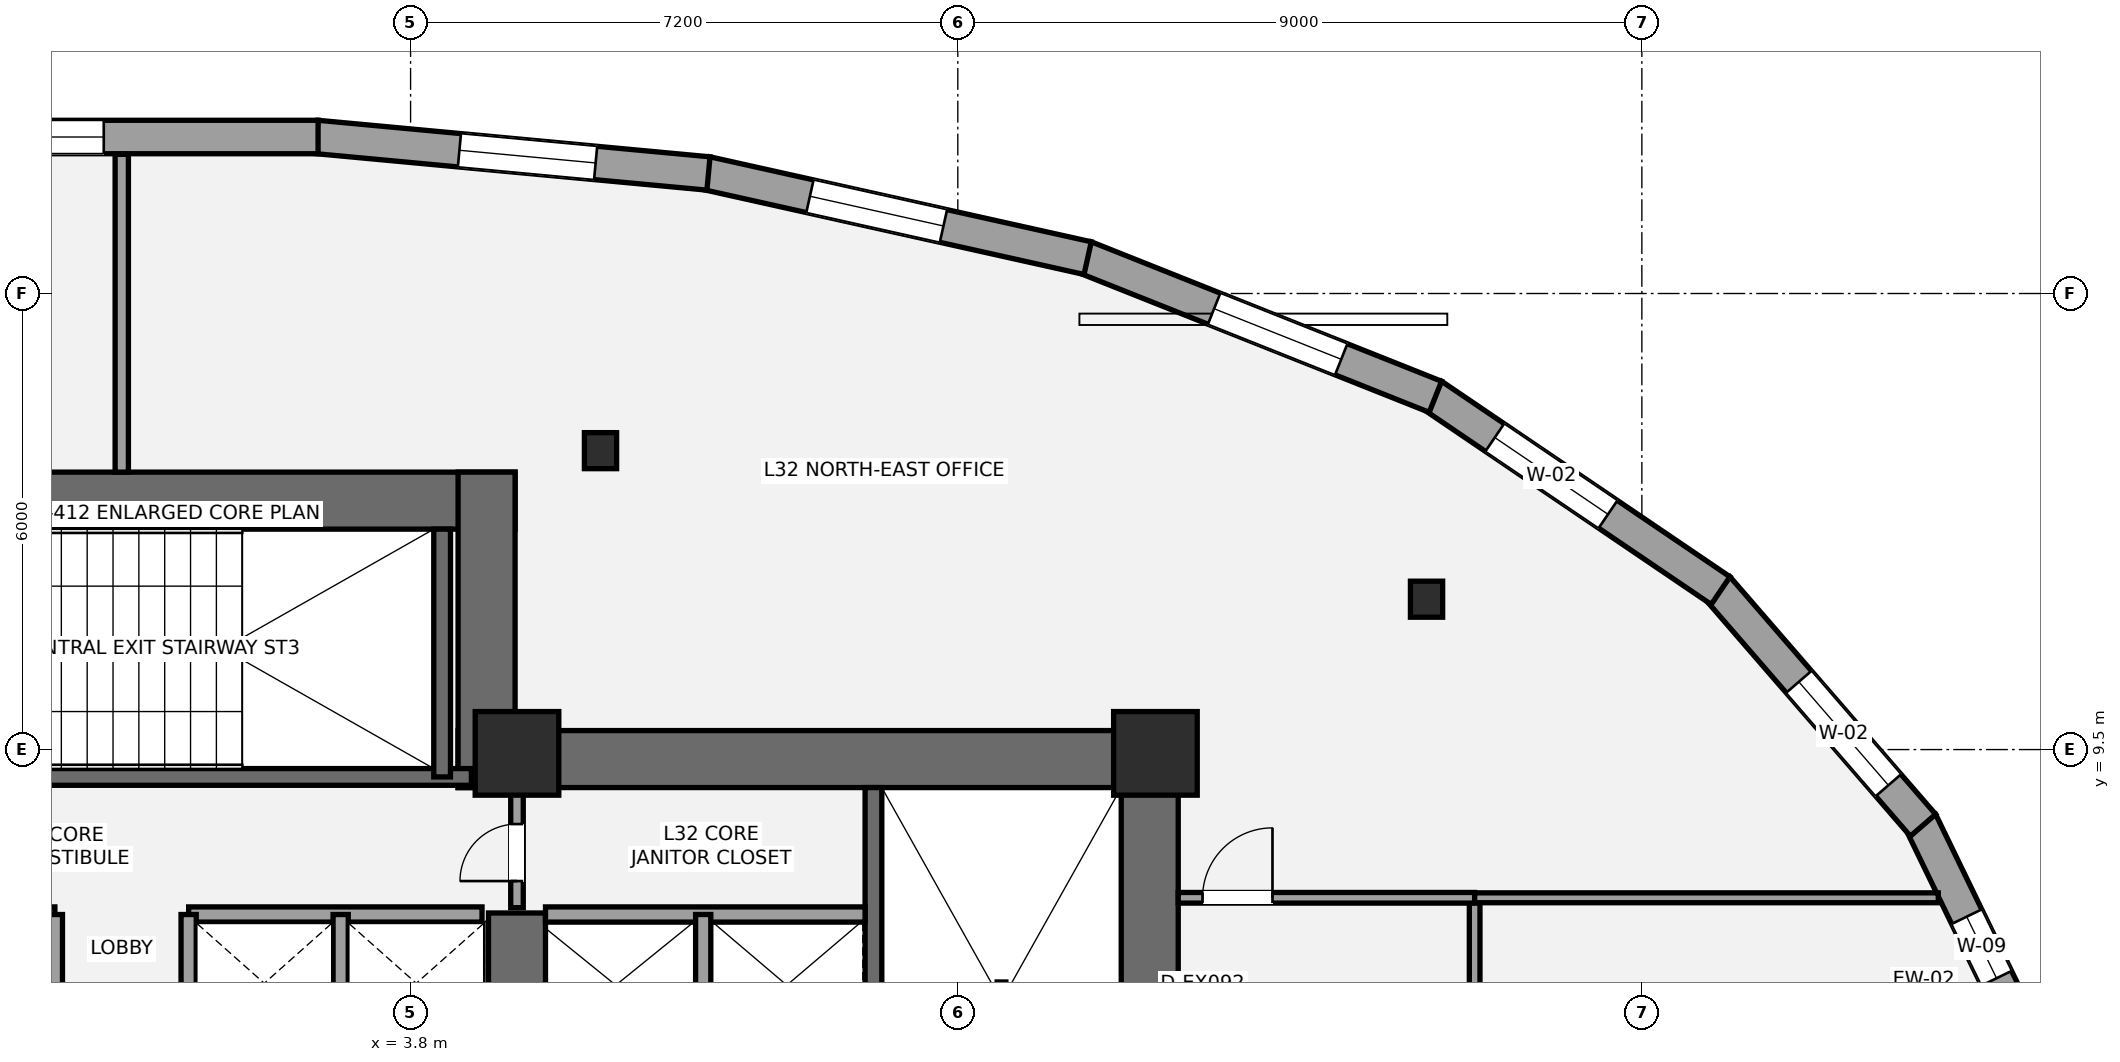
"""IFC4 building model, lengths in metres.
Left out: names, types, materials, properties, quantities, classifications, styles, units other than length and angle.
Written with IfcOpenShell. Run it as: python <this file> out.ifc"""

import sys

from ifc_helpers import new_model, si_unit, direction, frame, frame_2d, origin, origin_2d, place, context, subcontext, project, spatial, rectangle, i_section, extrude, element, fill, save


model = new_model("IFC4")
c1 = context("Model", 3, precision=1e-05, world=origin(), true_north=direction((0.0, 1.0)))
c2 = subcontext(c1, "Body", "Model", "MODEL_VIEW")
j1 = project(units=[si_unit("LENGTHUNIT", "METRE"), si_unit("PLANEANGLEUNIT", "RADIAN")], contexts=[c1])
p1 = place(None, origin())
s1 = spatial("IfcSite", under=j1, at=p1, CompositionType="ELEMENT")
p2 = place(p1, origin())
s2 = spatial("IfcBuilding", under=s1, at=p2, CompositionType="ELEMENT")
p3 = place(p2, frame((0.0, 0.0, 121.1)))
s3 = spatial("IfcBuildingStorey", under=s2, at=p3, CompositionType="ELEMENT", Elevation=121.1)
p4 = place(p3, frame((13.525, 1.1, 0.0), z_axis=(0.0, 0.0, 1.0), x_axis=(0.0, 1.0, 0.0)))
e1 = element("IfcWall", 1, at=p4, inside=s3, PredefinedType="SHEAR", context=c2, shape_type="SweptSolid", body=[
    extrude(rectangle(XDim=8.65, YDim=0.75, at=frame_2d((4.325, 0.0))), origin(), (0.0, 0.0, 1.0), 3.5),
])
p5 = place(p3, frame((4.425, 9.375, 0.0), z_axis=(0.0, 0.0, 1.0), x_axis=(1.0, 0.0, 0.0)))
e2 = element("IfcWall", 2, at=p5, inside=s3, PredefinedType="SHEAR", context=c2, shape_type="SweptSolid", body=[
    extrude(rectangle(XDim=9.475, YDim=0.75, at=frame_2d((4.737, 0.0))), origin(), (0.0, 0.0, 1.0), 3.5),
])
p6 = place(p3, frame((5.2, 5.35, 0.0), z_axis=(0.0, 0.0, 1.0), x_axis=(0.0, 1.0, 0.0)))
e3 = element("IfcWall", 3, at=p6, inside=s3, PredefinedType="SHEAR", context=c2, shape_type="SweptSolid", body=[
    extrude(rectangle(XDim=2.0, YDim=0.75, at=frame_2d((1.0, 0.0))), origin(), (0.0, 0.0, 1.0), 3.5),
])
p7 = place(p3, frame((9.89, 1.85, 0.0), z_axis=(0.0, 0.0, 1.0), x_axis=(0.0, 1.0, 0.0)))
e4 = element("IfcWall", 4, at=p7, inside=s3, PredefinedType="SHEAR", context=c2, shape_type="SweptSolid", body=[
    extrude(rectangle(XDim=7.15, YDim=0.22, at=frame_2d((3.575, 0.0))), origin(), (0.0, 0.0, 1.0), 3.5),
])
p8 = place(p3, frame((-5.175, 12.775, 0.0), z_axis=(0.0, 0.0, 1.0), x_axis=(1.0, 0.0, 0.0)))
e5 = element("IfcWall", 5, at=p8, inside=s3, PredefinedType="SHEAR", context=c2, shape_type="SweptSolid", body=[
    extrude(rectangle(XDim=10.35, YDim=0.75, at=frame_2d((5.175, 0.0))), origin(), (0.0, 0.0, 1.0), 3.5),
])
p9 = place(p3, frame((4.8, 9.0, 0.0), z_axis=(0.0, 0.0, 1.0), x_axis=(0.0, 1.0, 0.0)))
e6 = element("IfcWall", 6, at=p9, inside=s3, PredefinedType="SHEAR", context=c2, shape_type="SweptSolid", body=[
    extrude(rectangle(XDim=4.15, YDim=0.75, at=frame_2d((2.075, 0.0))), origin(), (0.0, 0.0, 1.0), 3.5),
])
p10 = place(p3, frame((-4.7, 9.14, 0.0), z_axis=(0.0, 0.0, 1.0), x_axis=(1.0, 0.0, 0.0)))
e7 = element("IfcWall", 7, at=p10, inside=s3, PredefinedType="SHEAR", context=c2, shape_type="SweptSolid", body=[
    extrude(rectangle(XDim=9.3, YDim=0.22, at=frame_2d((4.65, 0.0))), origin(), (0.0, 0.0, 1.0), 3.5),
])
p11 = place(p10, frame((1.15, 0.0, 0.0)))
e8 = element("IfcOpeningElement", 8, at=p11, cuts=e7, PredefinedType="OPENING", context=c2, shape_type="SweptSolid", body=[
    extrude(rectangle(XDim=1.05, YDim=2.15, at=frame_2d((0.525, 1.075))), frame((0.0, 0.12, 0.0), z_axis=(0.0, -1.0, 0.0), x_axis=(1.0, 0.0, 0.0)), (0.0, 0.0, 1.0), 0.24),
])
p12 = place(p3, frame((4.215, 9.14, 0.0), z_axis=(0.0, 0.0, 1.0), x_axis=(0.0, 1.0, 0.0)))
e9 = element("IfcWall", 9, at=p12, inside=s3, PredefinedType="SHEAR", context=c2, shape_type="SweptSolid", body=[
    extrude(rectangle(XDim=3.26, YDim=0.22, at=frame_2d((1.63, 0.0))), origin(), (0.0, 0.0, 1.0), 3.5),
])
for number, where, z_axis, x_axis in (
    (10, (5.2, 9.45, 0.0), (0.0, 0.0, 1.0), (1.0, 0.0, 0.0)),
    (11, (13.6, 9.45, 0.0), (0.0, 0.0, 1.0), (1.0, 0.0, 0.0)),
):
    element("IfcColumn", number, at=place(p3, frame(where, z_axis=z_axis, x_axis=x_axis)), inside=s3, PredefinedType="COLUMN", context=c2, shape_type="SweptSolid", body=[
        extrude(rectangle(XDim=1.1, YDim=1.1, at=origin_2d()), origin(), (0.0, 0.0, 1.0), 3.5),
    ])
for number, where, z_axis, x_axis in (
    (12, (17.167, 11.478, 0.0), (0.0, 0.0, 1.0), (1.0, 0.0, 0.0)),
    (13, (6.299, 13.433, 0.0), (0.0, 0.0, 1.0), (1.0, 0.0, 0.0)),
):
    element("IfcColumn", number, at=place(p3, frame(where, z_axis=z_axis, x_axis=x_axis)), inside=s3, PredefinedType="COLUMN", context=c2, shape_type="SweptSolid", body=[
        extrude(i_section(OverallWidth=0.424, OverallDepth=0.474, WebThickness=0.048, FlangeThickness=0.077, at=origin_2d()), origin(), (0.0, 0.0, 1.0), 3.5),
    ])
p13 = place(p3, frame((23.667, 8.552, 0.0), z_axis=(0.0, 0.0, 1.0), x_axis=(0.43625131955, -0.899824864177, 0.0)))
e14 = element("IfcWall", 14, at=p13, inside=s3, PredefinedType="STANDARD", context=c2, shape_type="SweptSolid", body=[
    extrude(rectangle(XDim=3.78, YDim=0.44, at=frame_2d((1.89, 0.0))), origin(), (0.0, 0.0, 1.0), 2.528),
])
p14 = place(p13, frame((1.39, 0.0, 0.92)))
e15 = element("IfcOpeningElement", 15, at=p14, cuts=e14, PredefinedType="OPENING", context=c2, shape_type="SweptSolid", body=[
    extrude(rectangle(XDim=0.9, YDim=1.35, at=frame_2d((0.45, 0.675))), frame((0.0, 0.23, 0.0), z_axis=(0.0, -1.0, 0.0), x_axis=(1.0, 0.0, 0.0)), (0.0, 0.0, 1.0), 0.46),
])
p15 = place(p3, frame((20.993, 11.629, 0.0), z_axis=(0.0, 0.0, 1.0), x_axis=(0.654644924638, -0.755936520249, 0.0)))
e16 = element("IfcWall", 16, at=p15, inside=s3, PredefinedType="STANDARD", context=c2, shape_type="SweptSolid", body=[
    extrude(rectangle(XDim=4.134, YDim=0.44, at=frame_2d((2.067, 0.0))), origin(), (0.0, 0.0, 1.0), 2.528),
])
p16 = place(p15, frame((1.638, 0.0, 0.65)))
e17 = element("IfcOpeningElement", 17, at=p16, cuts=e16, PredefinedType="OPENING", context=c2, shape_type="SweptSolid", body=[
    extrude(rectangle(XDim=1.8, YDim=1.7, at=frame_2d((0.9, 0.85))), frame((0.0, 0.23, 0.0), z_axis=(0.0, -1.0, 0.0), x_axis=(1.0, 0.0, 0.0)), (0.0, 0.0, 1.0), 0.46),
])
p17 = place(p3, frame((17.241, 14.164, 0.0), z_axis=(0.0, 0.0, 1.0), x_axis=(0.827707240431, -0.56116015908, 0.0)))
e18 = element("IfcWall", 18, at=p17, inside=s3, PredefinedType="STANDARD", context=c2, shape_type="SweptSolid", body=[
    extrude(rectangle(XDim=4.584, YDim=0.44, at=frame_2d((2.292, 0.0))), origin(), (0.0, 0.0, 1.0), 2.528),
])
p18 = place(p17, frame((0.995, 0.0, 0.65)))
e19 = element("IfcOpeningElement", 19, at=p18, cuts=e18, PredefinedType="OPENING", context=c2, shape_type="SweptSolid", body=[
    extrude(rectangle(XDim=1.8, YDim=1.7, at=frame_2d((0.9, 0.85))), frame((0.0, 0.23, 0.0), z_axis=(0.0, -1.0, 0.0), x_axis=(1.0, 0.0, 0.0)), (0.0, 0.0, 1.0), 0.46),
])
p19 = place(p3, frame((12.675, 15.976, 0.0), z_axis=(0.0, 0.0, 1.0), x_axis=(0.929089765506, -0.369854305953, 0.0)))
e20 = element("IfcWall", 20, at=p19, inside=s3, PredefinedType="STANDARD", context=c2, shape_type="SweptSolid", body=[
    extrude(rectangle(XDim=4.961, YDim=0.44, at=frame_2d((2.48, 0.0))), origin(), (0.0, 0.0, 1.0), 2.528),
])
p20 = place(p19, frame((1.827, 0.0, 0.65)))
e21 = element("IfcOpeningElement", 21, at=p20, cuts=e20, PredefinedType="OPENING", context=c2, shape_type="SweptSolid", body=[
    extrude(rectangle(XDim=1.8, YDim=1.7, at=frame_2d((0.9, 0.85))), frame((0.0, 0.23, 0.0), z_axis=(0.0, -1.0, 0.0), x_axis=(1.0, 0.0, 0.0)), (0.0, 0.0, 1.0), 0.46),
])
p21 = place(p3, frame((7.692, 17.083, 0.0), z_axis=(0.0, 0.0, 1.0), x_axis=(0.976058355685, -0.217508818896, 0.0)))
e22 = element("IfcWall", 22, at=p21, inside=s3, PredefinedType="STANDARD", context=c2, shape_type="SweptSolid", body=[
    extrude(rectangle(XDim=5.14, YDim=0.44, at=frame_2d((2.57, 0.0))), origin(), (0.0, 0.0, 1.0), 2.528),
])
p22 = place(p21, frame((1.396, 0.0, 0.65)))
e23 = element("IfcOpeningElement", 23, at=p22, cuts=e22, PredefinedType="OPENING", context=c2, shape_type="SweptSolid", body=[
    extrude(rectangle(XDim=1.8, YDim=1.7, at=frame_2d((0.9, 0.85))), frame((0.0, 0.23, 0.0), z_axis=(0.0, -1.0, 0.0), x_axis=(1.0, 0.0, 0.0)), (0.0, 0.0, 1.0), 0.46),
])
p23 = place(p3, frame((2.562, 17.56, 0.0), z_axis=(0.0, 0.0, 1.0), x_axis=(0.995683099415, -0.092817916047, 0.0)))
e24 = element("IfcWall", 24, at=p23, inside=s3, PredefinedType="STANDARD", context=c2, shape_type="SweptSolid", body=[
    extrude(rectangle(XDim=5.179, YDim=0.44, at=frame_2d((2.59, 0.0))), origin(), (0.0, 0.0, 1.0), 2.528),
])
p24 = place(p23, frame((1.888, 0.0, 0.65)))
e25 = element("IfcOpeningElement", 25, at=p24, cuts=e24, PredefinedType="OPENING", context=c2, shape_type="SweptSolid", body=[
    extrude(rectangle(XDim=1.8, YDim=1.7, at=frame_2d((0.9, 0.85))), frame((0.0, 0.23, 0.0), z_axis=(0.0, -1.0, 0.0), x_axis=(1.0, 0.0, 0.0)), (0.0, 0.0, 1.0), 0.46),
])
p25 = place(p3, frame((-2.583, 17.559, 0.0), z_axis=(0.0, 0.0, 1.0), x_axis=(1.0, 0.0, 0.0)))
e26 = element("IfcWall", 26, at=p25, inside=s3, PredefinedType="STANDARD", context=c2, shape_type="SweptSolid", body=[
    extrude(rectangle(XDim=5.166, YDim=0.44, at=frame_2d((2.583, 0.0))), origin(), (0.0, 0.0, 1.0), 2.528),
])
p26 = place(p25, frame((0.546, 0.0, 0.65)))
e27 = element("IfcOpeningElement", 27, at=p26, cuts=e26, PredefinedType="OPENING", context=c2, shape_type="SweptSolid", body=[
    extrude(rectangle(XDim=1.8, YDim=1.7, at=frame_2d((0.9, 0.85))), frame((0.0, 0.23, 0.0), z_axis=(0.0, -1.0, 0.0), x_axis=(1.0, 0.0, 0.0)), (0.0, 0.0, 1.0), 0.46),
])
p27 = place(p3, frame((5.575, 7.33, 0.0), z_axis=(0.0, 0.0, 1.0), x_axis=(1.0, 0.0, 0.0)))
e28 = element("IfcWall", 28, at=p27, inside=s3, PredefinedType="SOLIDWALL", context=c2, shape_type="SweptSolid", body=[
    extrude(rectangle(XDim=4.205, YDim=0.2, at=frame_2d((2.103, 0.0))), origin(), (0.0, 0.0, 1.0), 3.31),
])
p28 = place(p3, frame((7.65, 5.47, 0.0), z_axis=(0.0, 0.0, 1.0), x_axis=(0.0, 1.0, 0.0)))
e29 = element("IfcWall", 29, at=p28, inside=s3, PredefinedType="SOLIDWALL", context=c2, shape_type="SweptSolid", body=[
    extrude(rectangle(XDim=1.86, YDim=0.2, at=frame_2d((0.93, 0.0))), origin(), (0.0, 0.0, 1.0), 3.31),
])
for number, where, z_axis, x_axis in (
    (30, (-4.74, 7.33, 0.0), (0.0, 0.0, 1.0), (1.0, 0.0, 0.0)),
    (31, (0.88, 7.33, 0.0), (0.0, 0.0, 1.0), (1.0, 0.0, 0.0)),
):
    element("IfcWall", number, at=place(p3, frame(where, z_axis=z_axis, x_axis=x_axis)), inside=s3, PredefinedType="SOLIDWALL", context=c2, shape_type="SweptSolid", body=[
        extrude(rectangle(XDim=3.86, YDim=0.2, at=frame_2d((1.93, 0.0))), origin(), (0.0, 0.0, 1.0), 3.31),
    ])
for number, where, z_axis, x_axis in (
    (32, (2.88, 5.52, 0.0), (0.0, 0.0, 1.0), (0.0, 1.0, 0.0)),
    (33, (-0.88, 5.52, 0.0), (0.0, 0.0, 1.0), (0.0, 1.0, 0.0)),
    (34, (0.88, 5.52, 0.0), (0.0, 0.0, 1.0), (0.0, 1.0, 0.0)),
):
    element("IfcWall", number, at=place(p3, frame(where, z_axis=z_axis, x_axis=x_axis)), inside=s3, PredefinedType="SOLIDWALL", context=c2, shape_type="SweptSolid", body=[
        extrude(rectangle(XDim=1.81, YDim=0.2, at=frame_2d((0.905, 0.0))), origin(), (0.0, 0.0, 1.0), 3.31),
    ])
p29 = place(p3, frame((5.2, 7.42, 0.0), z_axis=(0.0, 0.0, 1.0), x_axis=(0.0, 1.0, 0.0)))
e35 = element("IfcWall", 35, at=p29, inside=s3, PredefinedType="PARTITIONING", context=c2, shape_type="SweptSolid", body=[
    extrude(rectangle(XDim=1.58, YDim=0.165, at=frame_2d((0.79, 0.0))), origin(), (0.0, 0.0, 1.0), 3.31),
])
p30 = place(p29, frame((0.35, 0.0, 0.0)))
e36 = element("IfcOpeningElement", 36, at=p30, cuts=e35, PredefinedType="OPENING", context=c2, shape_type="SweptSolid", body=[
    extrude(rectangle(XDim=0.75, YDim=2.1, at=frame_2d((0.375, 1.05))), frame((0.0, 0.093, 0.0), z_axis=(0.0, -1.0, 0.0), x_axis=(1.0, 0.0, 0.0)), (0.0, 0.0, 1.0), 0.185),
])
p31 = place(p3, frame((17.8, -13.51, 0.0), z_axis=(0.0, 0.0, 1.0), x_axis=(0.0, 1.0, 0.0)))
e37 = element("IfcWall", 37, at=p31, inside=s3, PredefinedType="PARTITIONING", context=c2, shape_type="SweptSolid", body=[
    extrude(rectangle(XDim=21.06, YDim=0.14, at=frame_2d((10.53, 0.0))), origin(), (0.0, 0.0, 1.0), 2.688),
])
p32 = place(p31, frame((11.159, 0.0, 0.0)))
e38 = element("IfcOpeningElement", 38, at=p32, cuts=e37, PredefinedType="OPENING", context=c2, shape_type="SweptSolid", body=[
    extrude(rectangle(XDim=0.9, YDim=2.1, at=frame_2d((0.45, 1.05))), frame((0.0, 0.08, 0.0), z_axis=(0.0, -1.0, 0.0), x_axis=(1.0, 0.0, 0.0)), (0.0, 0.0, 1.0), 0.16),
])
p33 = place(p31, frame((18.034, 0.0, 0.0)))
e39 = element("IfcOpeningElement", 39, at=p33, cuts=e37, PredefinedType="OPENING", context=c2, shape_type="SweptSolid", body=[
    extrude(rectangle(XDim=0.9, YDim=2.1, at=frame_2d((0.45, 1.05))), frame((0.0, 0.08, 0.0), z_axis=(0.0, -1.0, 0.0), x_axis=(1.0, 0.0, 0.0)), (0.0, 0.0, 1.0), 0.16),
])
p34 = place(p3, frame((13.9, 7.55, 0.0), z_axis=(0.0, 0.0, 1.0), x_axis=(1.0, 0.0, 0.0)))
e40 = element("IfcWall", 40, at=p34, inside=s3, PredefinedType="PARTITIONING", context=c2, shape_type="SweptSolid", body=[
    extrude(rectangle(XDim=3.9, YDim=0.14, at=frame_2d((1.95, 0.0))), origin(), (0.0, 0.0, 1.0), 2.763),
])
p35 = place(p34, frame((0.32, 0.0, 0.0)))
e41 = element("IfcOpeningElement", 41, at=p35, cuts=e40, PredefinedType="OPENING", context=c2, shape_type="SweptSolid", body=[
    extrude(rectangle(XDim=0.92, YDim=2.15, at=frame_2d((0.46, 1.075))), frame((0.0, 0.08, 0.0), z_axis=(0.0, -1.0, 0.0), x_axis=(1.0, 0.0, 0.0)), (0.0, 0.0, 1.0), 0.16),
])
p36 = place(p3, frame((0.0, 13.15, 0.0), z_axis=(0.0, 0.0, 1.0), x_axis=(0.0, 1.0, 0.0)))
e42 = element("IfcWall", 42, at=p36, inside=s3, PredefinedType="PARTITIONING", context=c2, shape_type="SweptSolid", body=[
    extrude(rectangle(XDim=4.181, YDim=0.175, at=frame_2d((2.09, 0.0))), origin(), (0.0, 0.0, 1.0), 3.31),
])
p37 = place(p3, frame((17.8, 7.55, 0.0), z_axis=(0.0, 0.0, 1.0), x_axis=(1.0, 0.0, 0.0)))
e43 = element("IfcWall", 43, at=p37, inside=s3, PredefinedType="PARTITIONING", context=c2, shape_type="SweptSolid", body=[
    extrude(rectangle(XDim=6.1, YDim=0.13, at=frame_2d((3.05, 0.0))), origin(), (0.0, 0.0, 1.0), 3.31),
])
p38 = place(p14, origin())
e44 = element("IfcWindow", 44, at=p38, inside=s3, PartitioningType="SINGLE_PANEL", PredefinedType="WINDOW", context=c2, shape_type="SweptSolid", body=[
    extrude(rectangle(XDim=0.9, YDim=1.35, at=frame_2d((0.45, 0.675))), frame((0.0, -0.01, 0.0), z_axis=(0.0, -1.0, 0.0), x_axis=(1.0, 0.0, 0.0)), (0.0, 0.0, 1.0), 0.06),
])
fill(e15, e44)
p39 = place(p16, origin())
e45 = element("IfcWindow", 45, at=p39, inside=s3, PartitioningType="SINGLE_PANEL", PredefinedType="WINDOW", context=c2, shape_type="SweptSolid", body=[
    extrude(rectangle(XDim=1.8, YDim=1.7, at=frame_2d((0.9, 0.85))), frame((0.0, -0.01, 0.0), z_axis=(0.0, -1.0, 0.0), x_axis=(1.0, 0.0, 0.0)), (0.0, 0.0, 1.0), 0.06),
])
fill(e17, e45)
p40 = place(p18, origin())
e46 = element("IfcWindow", 46, at=p40, inside=s3, PartitioningType="SINGLE_PANEL", PredefinedType="WINDOW", context=c2, shape_type="SweptSolid", body=[
    extrude(rectangle(XDim=1.8, YDim=1.7, at=frame_2d((0.9, 0.85))), frame((0.0, -0.01, 0.0), z_axis=(0.0, -1.0, 0.0), x_axis=(1.0, 0.0, 0.0)), (0.0, 0.0, 1.0), 0.06),
])
fill(e19, e46)
p41 = place(p20, origin())
e47 = element("IfcWindow", 47, at=p41, inside=s3, PartitioningType="SINGLE_PANEL", PredefinedType="WINDOW", context=c2, shape_type="SweptSolid", body=[
    extrude(rectangle(XDim=1.8, YDim=1.7, at=frame_2d((0.9, 0.85))), frame((0.0, -0.01, 0.0), z_axis=(0.0, -1.0, 0.0), x_axis=(1.0, 0.0, 0.0)), (0.0, 0.0, 1.0), 0.06),
])
fill(e21, e47)
p42 = place(p22, origin())
e48 = element("IfcWindow", 48, at=p42, inside=s3, PartitioningType="SINGLE_PANEL", PredefinedType="WINDOW", context=c2, shape_type="SweptSolid", body=[
    extrude(rectangle(XDim=1.8, YDim=1.7, at=frame_2d((0.9, 0.85))), frame((0.0, -0.01, 0.0), z_axis=(0.0, -1.0, 0.0), x_axis=(1.0, 0.0, 0.0)), (0.0, 0.0, 1.0), 0.06),
])
fill(e23, e48)
p43 = place(p24, origin())
e49 = element("IfcWindow", 49, at=p43, inside=s3, PartitioningType="SINGLE_PANEL", PredefinedType="WINDOW", context=c2, shape_type="SweptSolid", body=[
    extrude(rectangle(XDim=1.8, YDim=1.7, at=frame_2d((0.9, 0.85))), frame((0.0, -0.01, 0.0), z_axis=(0.0, -1.0, 0.0), x_axis=(1.0, 0.0, 0.0)), (0.0, 0.0, 1.0), 0.06),
])
fill(e25, e49)
p44 = place(p26, origin())
e50 = element("IfcWindow", 50, at=p44, inside=s3, PartitioningType="SINGLE_PANEL", PredefinedType="WINDOW", context=c2, shape_type="SweptSolid", body=[
    extrude(rectangle(XDim=1.8, YDim=1.7, at=frame_2d((0.9, 0.85))), frame((0.0, -0.01, 0.0), z_axis=(0.0, -1.0, 0.0), x_axis=(1.0, 0.0, 0.0)), (0.0, 0.0, 1.0), 0.06),
])
fill(e27, e50)
p45 = place(p30, origin())
e51 = element("IfcDoor", 51, at=p45, inside=s3, OperationType="SINGLE_SWING_LEFT", PredefinedType="DOOR", context=c2, shape_type="SweptSolid", body=[
    extrude(rectangle(XDim=0.75, YDim=2.1, at=frame_2d((0.375, 1.05))), frame((0.0, 0.025, 0.0), z_axis=(0.0, -1.0, 0.0), x_axis=(1.0, 0.0, 0.0)), (0.0, 0.0, 1.0), 0.05),
])
fill(e36, e51)
p46 = place(p35, origin())
e52 = element("IfcDoor", 52, at=p46, inside=s3, OperationType="SINGLE_SWING_RIGHT", PredefinedType="DOOR", context=c2, shape_type="SweptSolid", body=[
    extrude(rectangle(XDim=0.92, YDim=2.15, at=frame_2d((0.46, 1.075))), frame((0.0, 0.025, 0.0), z_axis=(0.0, -1.0, 0.0), x_axis=(1.0, 0.0, 0.0)), (0.0, 0.0, 1.0), 0.05),
])
fill(e41, e52)
save(model, sys.argv[1])
